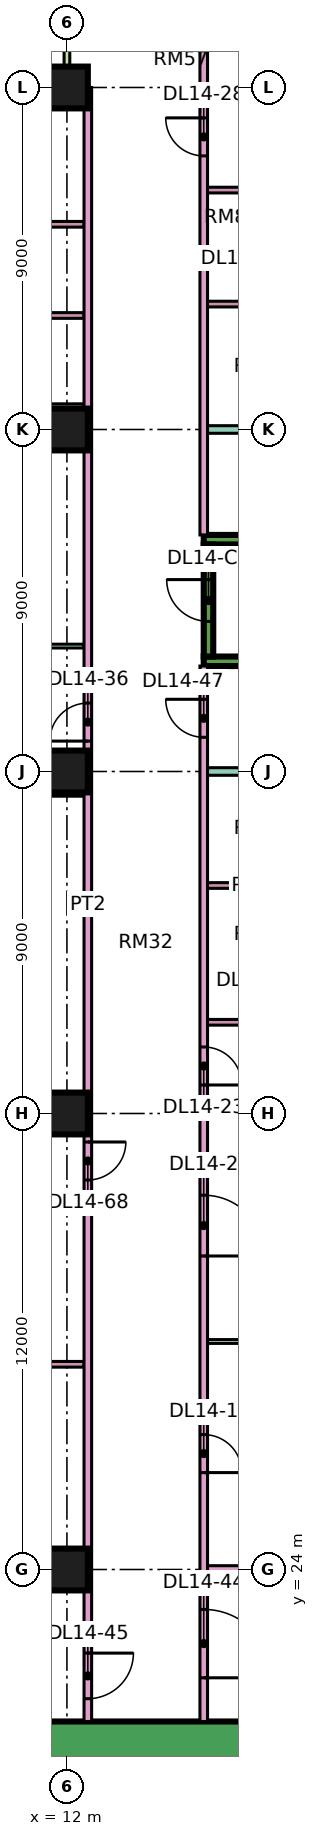
"""IFC4 building model, lengths in metres.
Left out: names, types, materials, properties, quantities, classifications, styles, units other than length and angle.
Written with IfcOpenShell. Run it as: python <this file> out.ifc"""

import sys

from ifc_helpers import new_model, si_unit, direction, frame, frame_2d, origin, origin_2d, place, context, subcontext, project, spatial, rectangle, extrude, element, fill, save


model = new_model("IFC4")
c1 = context("Model", 3, precision=1e-05, world=origin(), true_north=direction((0.0, 1.0)))
c2 = subcontext(c1, "Body", "Model", "MODEL_VIEW")
j1 = project(units=[si_unit("LENGTHUNIT", "METRE"), si_unit("PLANEANGLEUNIT", "RADIAN")], contexts=[c1])
p1 = place(None, origin())
s1 = spatial("IfcSite", under=j1, at=p1, CompositionType="ELEMENT")
p2 = place(p1, origin())
s2 = spatial("IfcBuilding", under=s1, at=p2, CompositionType="ELEMENT")
p3 = place(p2, frame((0.0, 0.0, 67.65)))
s3 = spatial("IfcBuildingStorey", under=s2, at=p3, CompositionType="ELEMENT", Elevation=67.65)
for number, where, z_axis, x_axis in (
    (1, (12.0, 24.0, 0.0), (0.0, 0.0, 1.0), (1.0, 0.0, 0.0)),
    (2, (12.0, 36.0, 0.0), (0.0, 0.0, 1.0), (1.0, 0.0, 0.0)),
    (3, (12.0, 45.0, 0.0), (0.0, 0.0, 1.0), (1.0, 0.0, 0.0)),
    (4, (12.0, 54.0, 0.0), (0.0, 0.0, 1.0), (1.0, 0.0, 0.0)),
    (5, (12.0, 63.0, 0.0), (0.0, 0.0, 1.0), (1.0, 0.0, 0.0)),
):
    element("IfcColumn", number, at=place(p3, frame(where, z_axis=z_axis, x_axis=x_axis)), inside=s3, PredefinedType="COLUMN", context=c2, shape_type="SweptSolid", body=[
        extrude(rectangle(XDim=1.1, YDim=1.1, at=origin_2d()), origin(), (0.0, 0.0, 1.0), 3.75),
    ])
p4 = place(p3, frame((9.0, 19.45, 0.0), z_axis=(0.0, 0.0, 1.0), x_axis=(1.0, 0.0, 0.0)))
e6 = element("IfcWall", 6, at=p4, inside=s3, PredefinedType="SHEAR", context=c2, shape_type="SweptSolid", body=[
    extrude(rectangle(XDim=25.0, YDim=1.1, at=frame_2d((12.5, 0.0))), origin(), (0.0, 0.0, 1.0), 3.75),
])
p5 = place(p4, frame((19.1, 0.0, 0.0)))
e7 = element("IfcOpeningElement", 7, at=p5, cuts=e6, PredefinedType="OPENING", context=c2, shape_type="SweptSolid", body=[
    extrude(rectangle(XDim=1.8, YDim=2.4, at=frame_2d((0.9, 1.2))), frame((0.0, 0.56, 0.0), z_axis=(0.0, -1.0, 0.0), x_axis=(1.0, 0.0, 0.0)), (0.0, 0.0, 1.0), 1.12),
])
for number, where, z_axis, x_axis in (
    (8, (15.6, 47.9, 0.0), (0.0, 0.0, 1.0), (1.0, 0.0, 0.0)),
    (9, (15.6, 51.1, 0.0), (0.0, 0.0, 1.0), (1.0, 0.0, 0.0)),
):
    element("IfcWall", number, at=place(p3, frame(where, z_axis=z_axis, x_axis=x_axis)), inside=s3, PredefinedType="SHEAR", context=c2, shape_type="SweptSolid", body=[
        extrude(rectangle(XDim=7.0, YDim=0.25, at=frame_2d((3.5, 0.0))), origin(), (0.0, 0.0, 1.0), 3.75),
    ])
p6 = place(p3, frame((15.725, 48.025, 0.0), z_axis=(0.0, 0.0, 1.0), x_axis=(0.0, 1.0, 0.0)))
e10 = element("IfcWall", 10, at=p6, inside=s3, PredefinedType="SHEAR", context=c2, shape_type="SweptSolid", body=[
    extrude(rectangle(XDim=2.95, YDim=0.25, at=frame_2d((1.475, 0.0))), origin(), (0.0, 0.0, 1.0), 3.75),
])
p7 = place(p6, frame((0.925, 0.0, 0.0)))
e11 = element("IfcOpeningElement", 11, at=p7, cuts=e10, PredefinedType="OPENING", context=c2, shape_type="SweptSolid", body=[
    extrude(rectangle(XDim=1.1, YDim=2.2, at=frame_2d((0.55, 1.1))), frame((0.0, 0.135, 0.0), z_axis=(0.0, -1.0, 0.0), x_axis=(1.0, 0.0, 0.0)), (0.0, 0.0, 1.0), 0.27),
])
p8 = place(p3, frame((11.925, 63.0, 0.0), z_axis=(0.0, 0.0, 1.0), x_axis=(-1.0, 0.0, 0.0)))
e12 = element("IfcWall", 12, at=p8, inside=s3, PredefinedType="SOLIDWALL", context=c2, shape_type="SweptSolid", body=[
    extrude(rectangle(XDim=10.35, YDim=0.15, at=frame_2d((5.175, 0.0))), origin(), (0.0, 0.0, 1.0), 3.35),
])
p9 = place(p8, frame((2.075, 0.0, 1.7)))
e13 = element("IfcOpeningElement", 13, at=p9, cuts=e12, PredefinedType="OPENING", context=c2, shape_type="SweptSolid", body=[
    extrude(rectangle(XDim=1.2, YDim=0.9, at=frame_2d((0.6, 0.45))), frame((0.0, 0.085, 0.0), z_axis=(0.0, -1.0, 0.0), x_axis=(1.0, 0.0, 0.0)), (0.0, 0.0, 1.0), 0.17),
])
p10 = place(p8, frame((7.262, 0.0, 0.0)))
e14 = element("IfcOpeningElement", 14, at=p10, cuts=e12, PredefinedType="OPENING", context=c2, shape_type="SweptSolid", body=[
    extrude(rectangle(XDim=1.8, YDim=2.4, at=frame_2d((0.9, 1.2))), frame((0.0, 0.085, 0.0), z_axis=(0.0, -1.0, 0.0), x_axis=(1.0, 0.0, 0.0)), (0.0, 0.0, 1.0), 0.17),
])
p11 = place(p3, frame((12.0, 64.5, 0.0), z_axis=(0.0, 0.0, 1.0), x_axis=(0.0, -1.0, 0.0)))
e15 = element("IfcWall", 15, at=p11, inside=s3, PredefinedType="SOLIDWALL", context=c2, shape_type="SweptSolid", body=[
    extrude(rectangle(XDim=1.5, YDim=0.15, at=frame_2d((0.75, 0.0))), origin(), (0.0, 0.0, 1.0), 3.35),
])
p12 = place(p3, frame((-1.35, 22.4, 0.0), z_axis=(0.0, 0.0, 1.0), x_axis=(1.0, 0.0, 0.0)))
e16 = element("IfcWall", 16, at=p12, inside=s3, PredefinedType="PARTITIONING", context=c2, shape_type="SweptSolid", body=[
    extrude(rectangle(XDim=13.8, YDim=0.2, at=frame_2d((6.9, 0.0))), origin(), (0.0, 0.0, 1.0), 3.35),
])
p13 = place(p3, frame((0.0, 36.0, 0.0), z_axis=(0.0, 0.0, 1.0), x_axis=(1.0, 0.0, 0.0)))
e17 = element("IfcWall", 17, at=p13, inside=s3, PredefinedType="PARTITIONING", context=c2, shape_type="SweptSolid", body=[
    extrude(rectangle(XDim=12.45, YDim=0.2, at=frame_2d((6.225, 0.0))), origin(), (0.0, 0.0, 1.0), 3.35),
])
p14 = place(p3, frame((7.2, 44.4, 0.0), z_axis=(0.0, 0.0, 1.0), x_axis=(1.0, 0.0, 0.0)))
e18 = element("IfcWall", 18, at=p14, inside=s3, PredefinedType="PARTITIONING", context=c2, shape_type="SweptSolid", body=[
    extrude(rectangle(XDim=5.25, YDim=0.1, at=frame_2d((2.625, 0.0))), origin(), (0.0, 0.0, 1.0), 3.35),
])
p15 = place(p3, frame((7.225, 29.4, 0.0), z_axis=(0.0, 0.0, 1.0), x_axis=(1.0, 0.0, 0.0)))
e19 = element("IfcWall", 19, at=p15, inside=s3, PredefinedType="PARTITIONING", context=c2, shape_type="SweptSolid", body=[
    extrude(rectangle(XDim=5.225, YDim=0.15, at=frame_2d((2.612, 0.0))), origin(), (0.0, 0.0, 1.0), 3.35),
])
p16 = place(p3, frame((7.225, 33.6, 0.0), z_axis=(0.0, 0.0, 1.0), x_axis=(1.0, 0.0, 0.0)))
e20 = element("IfcWall", 20, at=p16, inside=s3, PredefinedType="PARTITIONING", context=c2, shape_type="SweptSolid", body=[
    extrude(rectangle(XDim=5.225, YDim=0.15, at=frame_2d((2.612, 0.0))), origin(), (0.0, 0.0, 1.0), 3.35),
])
p17 = place(p16, frame((2.175, 0.0, 0.0)))
e21 = element("IfcOpeningElement", 21, at=p17, cuts=e20, PredefinedType="OPENING", context=c2, shape_type="SweptSolid", body=[
    extrude(rectangle(XDim=0.8, YDim=2.1, at=frame_2d((0.4, 1.05))), frame((0.0, 0.085, 0.0), z_axis=(0.0, -1.0, 0.0), x_axis=(1.0, 0.0, 0.0)), (0.0, 0.0, 1.0), 0.17),
])
p18 = place(p3, frame((7.225, 48.3, 0.0), z_axis=(0.0, 0.0, 1.0), x_axis=(1.0, 0.0, 0.0)))
e22 = element("IfcWall", 22, at=p18, inside=s3, PredefinedType="PARTITIONING", context=c2, shape_type="SweptSolid", body=[
    extrude(rectangle(XDim=5.225, YDim=0.1, at=frame_2d((2.612, 0.0))), origin(), (0.0, 0.0, 1.0), 3.35),
])
p19 = place(p18, frame((2.175, 0.0, 0.0)))
e23 = element("IfcOpeningElement", 23, at=p19, cuts=e22, PredefinedType="OPENING", context=c2, shape_type="SweptSolid", body=[
    extrude(rectangle(XDim=0.9, YDim=2.1, at=frame_2d((0.45, 1.05))), frame((0.0, 0.06, 0.0), z_axis=(0.0, -1.0, 0.0), x_axis=(1.0, 0.0, 0.0)), (0.0, 0.0, 1.0), 0.12),
])
for number, where, z_axis, x_axis in (
    (24, (7.225, 54.6, 0.0), (0.0, 0.0, 1.0), (1.0, 0.0, 0.0)),
    (25, (7.225, 57.0, 0.0), (0.0, 0.0, 1.0), (1.0, 0.0, 0.0)),
    (26, (7.225, 59.4, 0.0), (0.0, 0.0, 1.0), (1.0, 0.0, 0.0)),
):
    element("IfcWall", number, at=place(p3, frame(where, z_axis=z_axis, x_axis=x_axis)), inside=s3, PredefinedType="PARTITIONING", context=c2, shape_type="SweptSolid", body=[
        extrude(rectangle(XDim=5.225, YDim=0.15, at=frame_2d((2.612, 0.0))), origin(), (0.0, 0.0, 1.0), 3.35),
    ])
p20 = place(p3, frame((12.55, 20.0, 0.0), z_axis=(0.0, 0.0, 1.0), x_axis=(0.0, 1.0, 0.0)))
e27 = element("IfcWall", 27, at=p20, inside=s3, PredefinedType="PARTITIONING", context=c2, shape_type="SweptSolid", body=[
    extrude(rectangle(XDim=43.0, YDim=0.2, at=frame_2d((21.5, 0.0))), origin(), (0.0, 0.0, 1.0), 3.35),
])
p21 = place(p20, frame((25.8, 0.0, 0.0)))
e28 = element("IfcOpeningElement", 28, at=p21, cuts=e27, PredefinedType="OPENING", context=c2, shape_type="SweptSolid", body=[
    extrude(rectangle(XDim=1.0, YDim=2.1, at=frame_2d((0.5, 1.05))), frame((0.0, 0.11, 0.0), z_axis=(0.0, -1.0, 0.0), x_axis=(1.0, 0.0, 0.0)), (0.0, 0.0, 1.0), 0.22),
])
p22 = place(p20, frame((0.6, 0.0, 0.0)))
e29 = element("IfcOpeningElement", 29, at=p22, cuts=e27, PredefinedType="OPENING", context=c2, shape_type="SweptSolid", body=[
    extrude(rectangle(XDim=1.2, YDim=2.1, at=frame_2d((0.6, 1.05))), frame((0.0, 0.11, 0.0), z_axis=(0.0, -1.0, 0.0), x_axis=(1.0, 0.0, 0.0)), (0.0, 0.0, 1.0), 0.22),
])
p23 = place(p20, frame((14.25, 0.0, 0.0)))
e30 = element("IfcOpeningElement", 30, at=p23, cuts=e27, PredefinedType="OPENING", context=c2, shape_type="SweptSolid", body=[
    extrude(rectangle(XDim=1.0, YDim=2.1, at=frame_2d((0.5, 1.05))), frame((0.0, 0.11, 0.0), z_axis=(0.0, -1.0, 0.0), x_axis=(1.0, 0.0, 0.0)), (0.0, 0.0, 1.0), 0.22),
])
p24 = place(p3, frame((15.6, 20.0, 0.0), z_axis=(0.0, 0.0, 1.0), x_axis=(0.0, 1.0, 0.0)))
e31 = element("IfcWall", 31, at=p24, inside=s3, PredefinedType="PARTITIONING", context=c2, shape_type="SweptSolid", body=[
    extrude(rectangle(XDim=27.775, YDim=0.2, at=frame_2d((13.887, 0.0))), origin(), (0.0, 0.0, 1.0), 3.35),
])
p25 = place(p24, frame((6.55, 0.0, 0.0)))
e32 = element("IfcOpeningElement", 32, at=p25, cuts=e31, PredefinedType="OPENING", context=c2, shape_type="SweptSolid", body=[
    extrude(rectangle(XDim=1.0, YDim=2.1, at=frame_2d((0.5, 1.05))), frame((0.0, 0.11, 0.0), z_axis=(0.0, -1.0, 0.0), x_axis=(1.0, 0.0, 0.0)), (0.0, 0.0, 1.0), 0.22),
])
p26 = place(p24, frame((12.25, 0.0, 0.0)))
e33 = element("IfcOpeningElement", 33, at=p26, cuts=e31, PredefinedType="OPENING", context=c2, shape_type="SweptSolid", body=[
    extrude(rectangle(XDim=1.6, YDim=2.1, at=frame_2d((0.8, 1.05))), frame((0.0, 0.11, 0.0), z_axis=(0.0, -1.0, 0.0), x_axis=(1.0, 0.0, 0.0)), (0.0, 0.0, 1.0), 0.22),
])
p27 = place(p24, frame((16.75, 0.0, 0.0)))
e34 = element("IfcOpeningElement", 34, at=p27, cuts=e31, PredefinedType="OPENING", context=c2, shape_type="SweptSolid", body=[
    extrude(rectangle(XDim=1.0, YDim=2.1, at=frame_2d((0.5, 1.05))), frame((0.0, 0.11, 0.0), z_axis=(0.0, -1.0, 0.0), x_axis=(1.0, 0.0, 0.0)), (0.0, 0.0, 1.0), 0.22),
])
p28 = place(p24, frame((1.15, 0.0, 0.0)))
e35 = element("IfcOpeningElement", 35, at=p28, cuts=e31, PredefinedType="OPENING", context=c2, shape_type="SweptSolid", body=[
    extrude(rectangle(XDim=1.8, YDim=2.1, at=frame_2d((0.9, 1.05))), frame((0.0, 0.11, 0.0), z_axis=(0.0, -1.0, 0.0), x_axis=(1.0, 0.0, 0.0)), (0.0, 0.0, 1.0), 0.22),
])
p29 = place(p24, frame((25.9, 0.0, 0.0)))
e36 = element("IfcOpeningElement", 36, at=p29, cuts=e31, PredefinedType="OPENING", context=c2, shape_type="SweptSolid", body=[
    extrude(rectangle(XDim=1.0, YDim=2.1, at=frame_2d((0.5, 1.05))), frame((0.0, 0.11, 0.0), z_axis=(0.0, -1.0, 0.0), x_axis=(1.0, 0.0, 0.0)), (0.0, 0.0, 1.0), 0.22),
])
p30 = place(p3, frame((15.6, 51.225, 0.0), z_axis=(0.0, 0.0, 1.0), x_axis=(0.0, 1.0, 0.0)))
e37 = element("IfcWall", 37, at=p30, inside=s3, PredefinedType="PARTITIONING", context=c2, shape_type="SweptSolid", body=[
    extrude(rectangle(XDim=13.125, YDim=0.2, at=frame_2d((6.562, 0.0))), origin(), (0.0, 0.0, 1.0), 3.35),
])
p31 = place(p30, frame((9.975, 0.0, 0.0)))
e38 = element("IfcOpeningElement", 38, at=p31, cuts=e37, PredefinedType="OPENING", context=c2, shape_type="SweptSolid", body=[
    extrude(rectangle(XDim=1.0, YDim=2.1, at=frame_2d((0.5, 1.05))), frame((0.0, 0.11, 0.0), z_axis=(0.0, -1.0, 0.0), x_axis=(1.0, 0.0, 0.0)), (0.0, 0.0, 1.0), 0.22),
])
p32 = place(p3, frame((15.7, 24.0, 0.0), z_axis=(0.0, 0.0, 1.0), x_axis=(1.0, 0.0, 0.0)))
e39 = element("IfcWall", 39, at=p32, inside=s3, PredefinedType="PARTITIONING", context=c2, shape_type="SweptSolid", body=[
    extrude(rectangle(XDim=5.8, YDim=0.2, at=frame_2d((2.9, 0.0))), origin(), (0.0, 0.0, 1.0), 3.35),
])
p33 = place(p3, frame((15.7, 30.0, 0.0), z_axis=(0.0, 0.0, 1.0), x_axis=(1.0, 0.0, 0.0)))
e40 = element("IfcWall", 40, at=p33, inside=s3, PredefinedType="PARTITIONING", context=c2, shape_type="SweptSolid", body=[
    extrude(rectangle(XDim=5.8, YDim=0.1, at=frame_2d((2.9, 0.0))), origin(), (0.0, 0.0, 1.0), 3.35),
])
p34 = place(p3, frame((15.7, 36.0, 0.0), z_axis=(0.0, 0.0, 1.0), x_axis=(1.0, 0.0, 0.0)))
e41 = element("IfcWall", 41, at=p34, inside=s3, PredefinedType="PARTITIONING", context=c2, shape_type="SweptSolid", body=[
    extrude(rectangle(XDim=8.3, YDim=0.2, at=frame_2d((4.15, 0.0))), origin(), (0.0, 0.0, 1.0), 3.35),
])
p35 = place(p3, frame((15.7, 38.4, 0.0), z_axis=(0.0, 0.0, 1.0), x_axis=(1.0, 0.0, 0.0)))
e42 = element("IfcWall", 42, at=p35, inside=s3, PredefinedType="PARTITIONING", context=c2, shape_type="SweptSolid", body=[
    extrude(rectangle(XDim=2.525, YDim=0.15, at=frame_2d((1.263, 0.0))), origin(), (0.0, 0.0, 1.0), 3.35),
])
p36 = place(p35, frame((0.9, 0.0, 0.0)))
e43 = element("IfcOpeningElement", 43, at=p36, cuts=e42, PredefinedType="OPENING", context=c2, shape_type="SweptSolid", body=[
    extrude(rectangle(XDim=0.8, YDim=2.1, at=frame_2d((0.4, 1.05))), frame((0.0, 0.085, 0.0), z_axis=(0.0, -1.0, 0.0), x_axis=(1.0, 0.0, 0.0)), (0.0, 0.0, 1.0), 0.17),
])
p37 = place(p3, frame((15.7, 42.0, 0.0), z_axis=(0.0, 0.0, 1.0), x_axis=(1.0, 0.0, 0.0)))
e44 = element("IfcWall", 44, at=p37, inside=s3, PredefinedType="PARTITIONING", context=c2, shape_type="SweptSolid", body=[
    extrude(rectangle(XDim=2.525, YDim=0.15, at=frame_2d((1.263, 0.0))), origin(), (0.0, 0.0, 1.0), 3.35),
])
p38 = place(p3, frame((15.7, 45.0, 0.0), z_axis=(0.0, 0.0, 1.0), x_axis=(1.0, 0.0, 0.0)))
e45 = element("IfcWall", 45, at=p38, inside=s3, PredefinedType="PARTITIONING", context=c2, shape_type="SweptSolid", body=[
    extrude(rectangle(XDim=8.3, YDim=0.2, at=frame_2d((4.15, 0.0))), origin(), (0.0, 0.0, 1.0), 3.35),
])
p39 = place(p3, frame((15.7, 54.0, 0.0), z_axis=(0.0, 0.0, 1.0), x_axis=(1.0, 0.0, 0.0)))
e46 = element("IfcWall", 46, at=p39, inside=s3, PredefinedType="PARTITIONING", context=c2, shape_type="SweptSolid", body=[
    extrude(rectangle(XDim=8.226, YDim=0.2, at=frame_2d((4.113, 0.0))), origin(), (0.0, 0.0, 1.0), 3.35),
])
for number, where, z_axis, x_axis in (
    (47, (15.7, 57.3, 0.0), (0.0, 0.0, 1.0), (1.0, 0.0, 0.0)),
    (48, (15.7, 60.3, 0.0), (0.0, 0.0, 1.0), (1.0, 0.0, 0.0)),
):
    element("IfcWall", number, at=place(p3, frame(where, z_axis=z_axis, x_axis=x_axis)), inside=s3, PredefinedType="PARTITIONING", context=c2, shape_type="SweptSolid", body=[
        extrude(rectangle(XDim=2.525, YDim=0.15, at=frame_2d((1.263, 0.0))), origin(), (0.0, 0.0, 1.0), 3.35),
    ])
p40 = place(p7, frame((1.1, 0.0, 0.0), z_axis=(0.0, 0.0, 1.0), x_axis=(-1.0, 0.0, 0.0)))
e49 = element("IfcDoor", 49, at=p40, inside=s3, OperationType="SINGLE_SWING_RIGHT", PredefinedType="DOOR", context=c2, shape_type="SweptSolid", body=[
    extrude(rectangle(XDim=1.1, YDim=2.2, at=frame_2d((0.55, 1.1))), frame((0.0, 0.025, 0.0), z_axis=(0.0, -1.0, 0.0), x_axis=(1.0, 0.0, 0.0)), (0.0, 0.0, 1.0), 0.05),
])
fill(e11, e49)
p41 = place(p25, frame((1.0, 0.0, 0.0), z_axis=(0.0, 0.0, 1.0), x_axis=(-1.0, 0.0, 0.0)))
e50 = element("IfcDoor", 50, at=p41, inside=s3, OperationType="SINGLE_SWING_LEFT", PredefinedType="DOOR", context=c2, shape_type="SweptSolid", body=[
    extrude(rectangle(XDim=1.0, YDim=2.1, at=frame_2d((0.5, 1.05))), frame((0.0, 0.025, 0.0), z_axis=(0.0, -1.0, 0.0), x_axis=(1.0, 0.0, 0.0)), (0.0, 0.0, 1.0), 0.05),
])
fill(e32, e50)
p42 = place(p26, frame((1.6, 0.0, 0.0), z_axis=(0.0, 0.0, 1.0), x_axis=(-1.0, 0.0, 0.0)))
e51 = element("IfcDoor", 51, at=p42, inside=s3, OperationType="DOUBLE_DOOR_SINGLE_SWING", PredefinedType="DOOR", context=c2, shape_type="SweptSolid", body=[
    extrude(rectangle(XDim=1.6, YDim=2.1, at=frame_2d((0.8, 1.05))), frame((0.0, 0.025, 0.0), z_axis=(0.0, -1.0, 0.0), x_axis=(1.0, 0.0, 0.0)), (0.0, 0.0, 1.0), 0.05),
])
fill(e33, e51)
p43 = place(p27, frame((1.0, 0.0, 0.0), z_axis=(0.0, 0.0, 1.0), x_axis=(-1.0, 0.0, 0.0)))
e52 = element("IfcDoor", 52, at=p43, inside=s3, OperationType="SINGLE_SWING_LEFT", PredefinedType="DOOR", context=c2, shape_type="SweptSolid", body=[
    extrude(rectangle(XDim=1.0, YDim=2.1, at=frame_2d((0.5, 1.05))), frame((0.0, 0.025, 0.0), z_axis=(0.0, -1.0, 0.0), x_axis=(1.0, 0.0, 0.0)), (0.0, 0.0, 1.0), 0.05),
])
fill(e34, e52)
p44 = place(p31, frame((1.0, 0.0, 0.0), z_axis=(0.0, 0.0, 1.0), x_axis=(-1.0, 0.0, 0.0)))
e53 = element("IfcDoor", 53, at=p44, inside=s3, OperationType="SINGLE_SWING_RIGHT", PredefinedType="DOOR", context=c2, shape_type="SweptSolid", body=[
    extrude(rectangle(XDim=1.0, YDim=2.1, at=frame_2d((0.5, 1.05))), frame((0.0, 0.025, 0.0), z_axis=(0.0, -1.0, 0.0), x_axis=(1.0, 0.0, 0.0)), (0.0, 0.0, 1.0), 0.05),
])
fill(e38, e53)
p45 = place(p21, origin())
e54 = element("IfcDoor", 54, at=p45, inside=s3, OperationType="SINGLE_SWING_LEFT", PredefinedType="DOOR", context=c2, shape_type="SweptSolid", body=[
    extrude(rectangle(XDim=1.0, YDim=2.1, at=frame_2d((0.5, 1.05))), frame((0.0, 0.025, 0.0), z_axis=(0.0, -1.0, 0.0), x_axis=(1.0, 0.0, 0.0)), (0.0, 0.0, 1.0), 0.05),
])
fill(e28, e54)
p46 = place(p28, frame((1.8, 0.0, 0.0), z_axis=(0.0, 0.0, 1.0), x_axis=(-1.0, 0.0, 0.0)))
e55 = element("IfcDoor", 55, at=p46, inside=s3, OperationType="DOUBLE_DOOR_SINGLE_SWING", PredefinedType="DOOR", context=c2, shape_type="SweptSolid", body=[
    extrude(rectangle(XDim=1.8, YDim=2.1, at=frame_2d((0.9, 1.05))), frame((0.0, 0.025, 0.0), z_axis=(0.0, -1.0, 0.0), x_axis=(1.0, 0.0, 0.0)), (0.0, 0.0, 1.0), 0.05),
])
fill(e35, e55)
p47 = place(p22, origin())
e56 = element("IfcDoor", 56, at=p47, inside=s3, OperationType="SINGLE_SWING_RIGHT", PredefinedType="DOOR", context=c2, shape_type="SweptSolid", body=[
    extrude(rectangle(XDim=1.2, YDim=2.1, at=frame_2d((0.6, 1.05))), frame((0.0, 0.025, 0.0), z_axis=(0.0, -1.0, 0.0), x_axis=(1.0, 0.0, 0.0)), (0.0, 0.0, 1.0), 0.05),
])
fill(e29, e56)
p48 = place(p29, frame((1.0, 0.0, 0.0), z_axis=(0.0, 0.0, 1.0), x_axis=(-1.0, 0.0, 0.0)))
e57 = element("IfcDoor", 57, at=p48, inside=s3, OperationType="SINGLE_SWING_RIGHT", PredefinedType="DOOR", context=c2, shape_type="SweptSolid", body=[
    extrude(rectangle(XDim=1.0, YDim=2.1, at=frame_2d((0.5, 1.05))), frame((0.0, 0.025, 0.0), z_axis=(0.0, -1.0, 0.0), x_axis=(1.0, 0.0, 0.0)), (0.0, 0.0, 1.0), 0.05),
])
fill(e36, e57)
p49 = place(p23, origin())
e58 = element("IfcDoor", 58, at=p49, inside=s3, OperationType="SINGLE_SWING_RIGHT", PredefinedType="DOOR", context=c2, shape_type="SweptSolid", body=[
    extrude(rectangle(XDim=1.0, YDim=2.1, at=frame_2d((0.5, 1.05))), frame((0.0, 0.025, 0.0), z_axis=(0.0, -1.0, 0.0), x_axis=(1.0, 0.0, 0.0)), (0.0, 0.0, 1.0), 0.05),
])
fill(e30, e58)
save(model, sys.argv[1])
